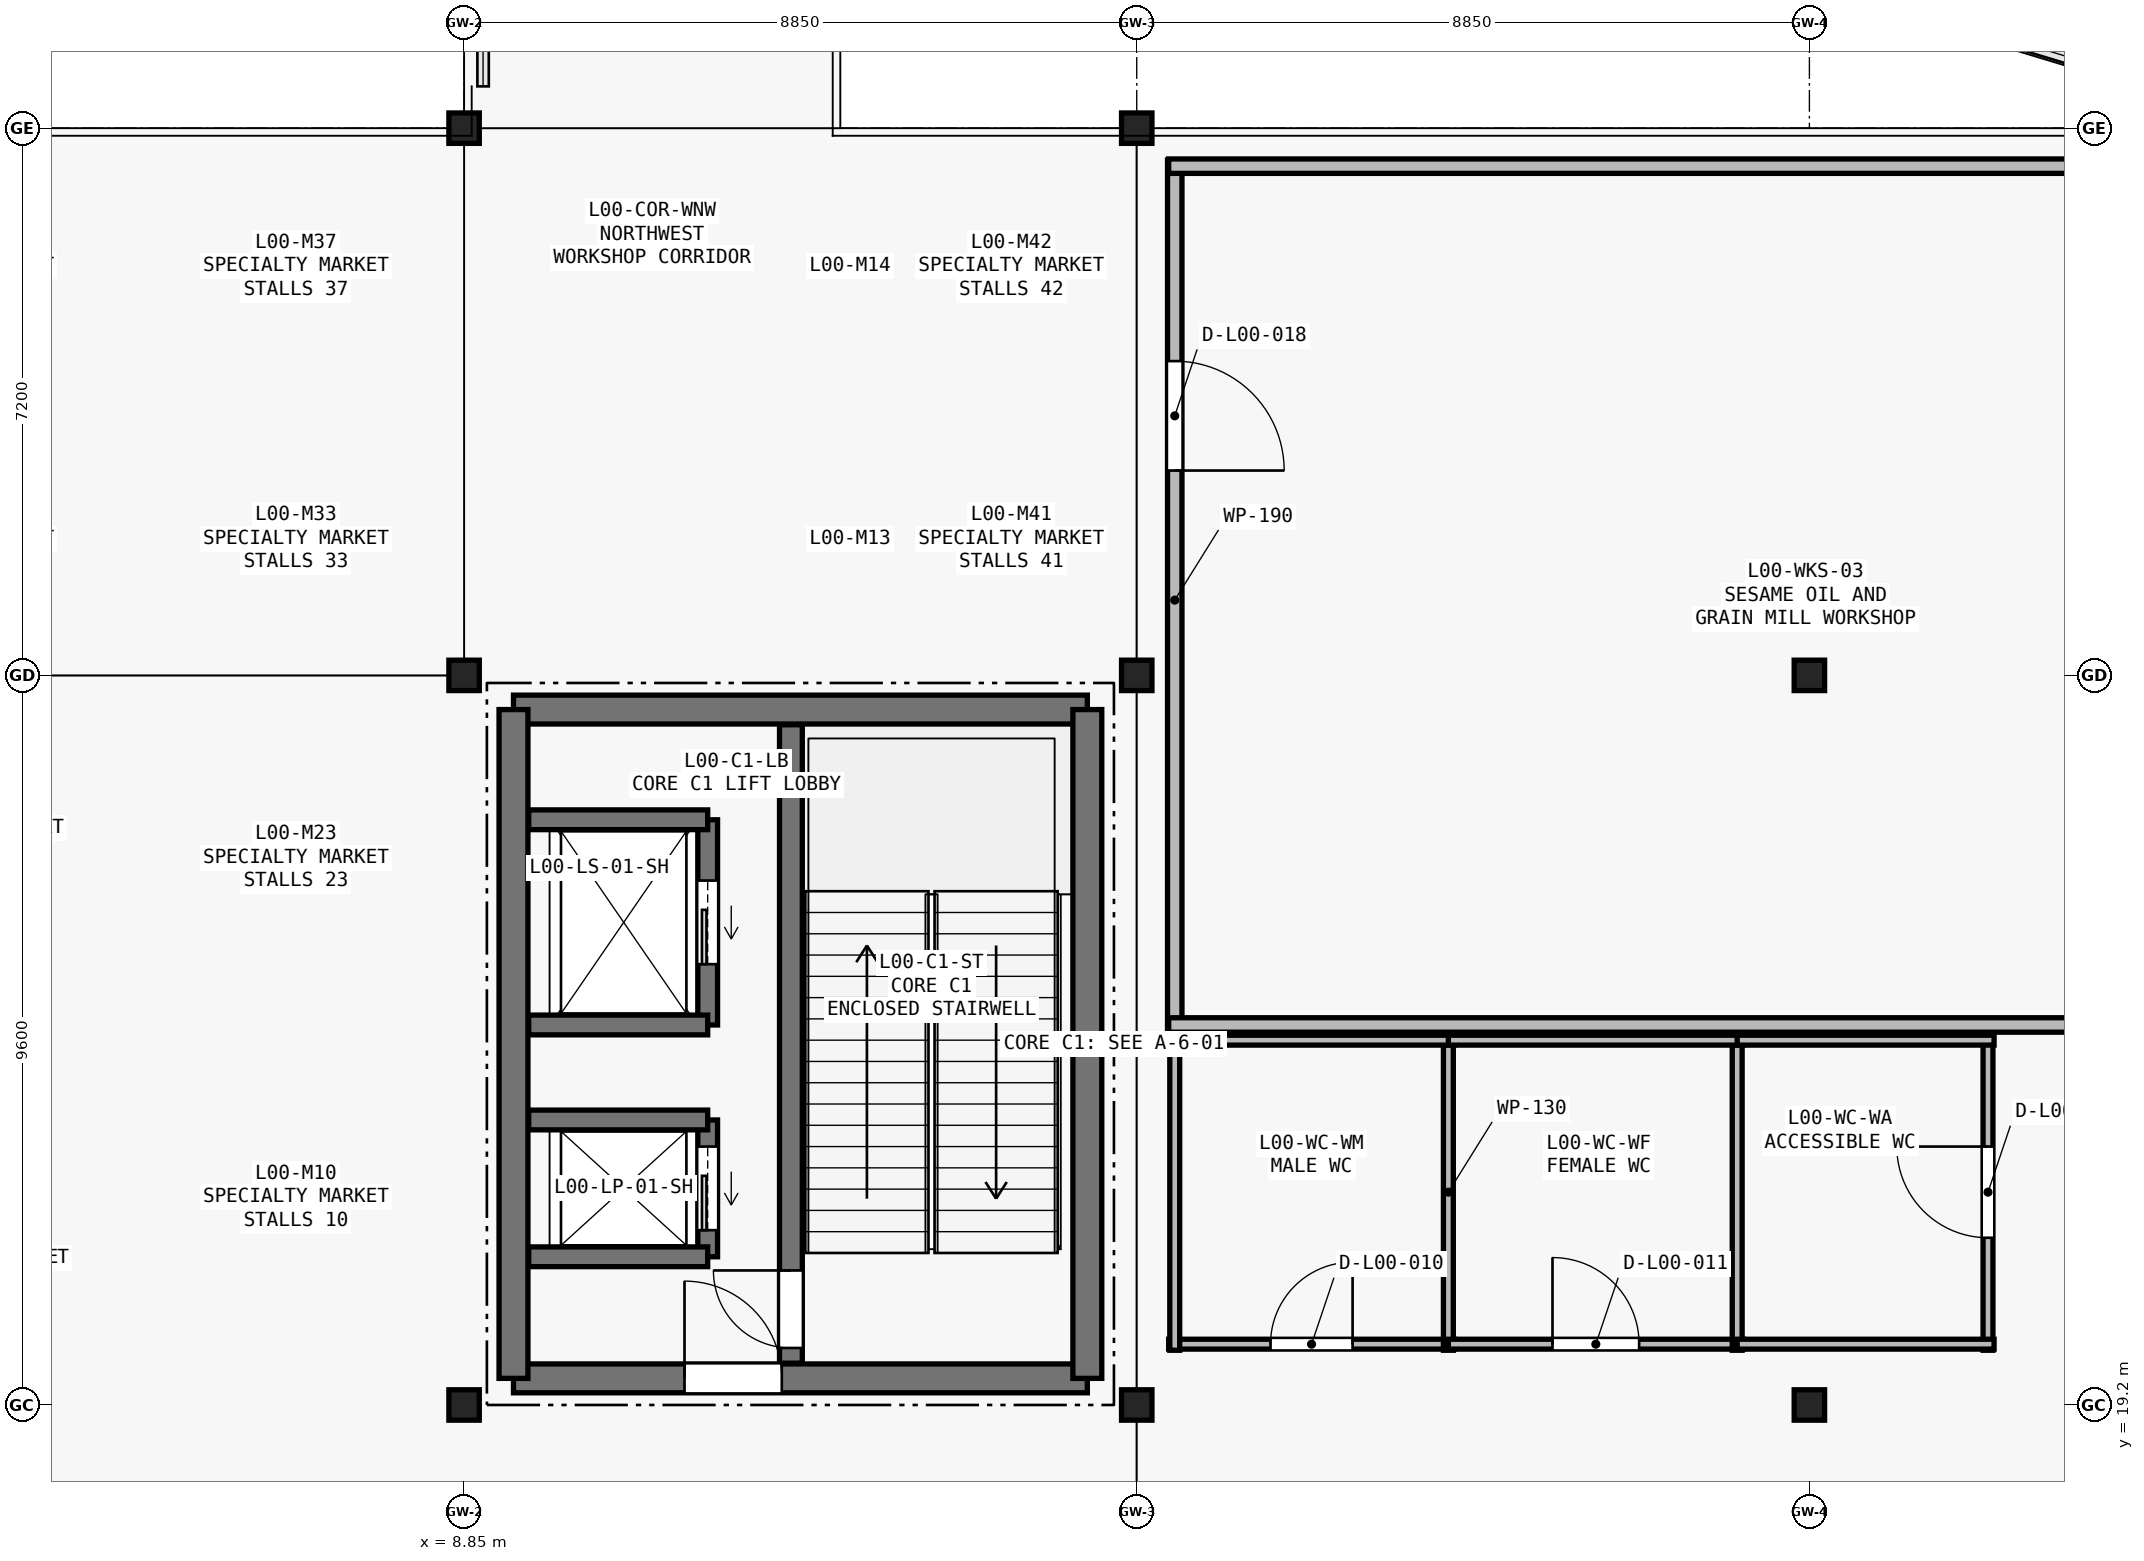
"""IFC4 building model, lengths in metres.
Left out: names, types, materials, properties, quantities, classifications, styles, units other than length and angle.
Written with IfcOpenShell. Run it as: python <this file> out.ifc"""

import sys

from ifc_helpers import new_model, si_unit, direction, frame, frame_2d, origin, origin_2d, place, context, subcontext, project, spatial, rectangle, i_section, extrude, element, fill, save


model = new_model("IFC4")
c1 = context("Model", 3, precision=1e-05, world=origin(), true_north=direction((0.0, 1.0)))
c2 = subcontext(c1, "Body", "Model", "MODEL_VIEW")
j1 = project(units=[si_unit("LENGTHUNIT", "METRE"), si_unit("PLANEANGLEUNIT", "RADIAN")], contexts=[c1])
p1 = place(None, origin())
s1 = spatial("IfcSite", under=j1, at=p1, CompositionType="ELEMENT")
p2 = place(p1, origin())
s2 = spatial("IfcBuilding", under=s1, at=p2, CompositionType="ELEMENT")
p3 = place(p2, origin())
s3 = spatial("IfcBuildingStorey", under=s2, at=p3, CompositionType="ELEMENT", Elevation=0.0)
for number, where, z_axis, x_axis in (
    (1, (8.85, 19.2, 0.0), (0.0, 0.0, 1.0), (1.0, 0.0, 0.0)),
    (2, (8.85, 28.8, 0.0), (0.0, 0.0, 1.0), (1.0, 0.0, 0.0)),
    (3, (8.85, 36.0, 0.0), (0.0, 0.0, 1.0), (1.0, 0.0, 0.0)),
    (4, (17.7, 19.2, 0.0), (0.0, 0.0, 1.0), (1.0, 0.0, 0.0)),
    (5, (17.7, 28.8, 0.0), (0.0, 0.0, 1.0), (1.0, 0.0, 0.0)),
    (6, (17.7, 36.0, 0.0), (0.0, 0.0, 1.0), (1.0, 0.0, 0.0)),
    (7, (26.55, 19.2, 0.0), (0.0, 0.0, 1.0), (1.0, 0.0, 0.0)),
    (8, (26.55, 28.8, 0.0), (0.0, 0.0, 1.0), (1.0, 0.0, 0.0)),
):
    element("IfcColumn", number, at=place(p3, frame(where, z_axis=z_axis, x_axis=x_axis)), inside=s3, PredefinedType="COLUMN", context=c2, shape_type="SweptSolid", body=[
        extrude(i_section(OverallWidth=0.4, OverallDepth=0.4, WebThickness=0.013, FlangeThickness=0.021, FilletRadius=0.022, at=origin_2d()), origin(), (0.0, 0.0, 1.0), 6.0),
    ])
p4 = place(p2, frame((0.0, 0.0, -5.4)))
s4 = spatial("IfcBuildingStorey", under=s2, at=p4, CompositionType="ELEMENT", Elevation=-5.4)
p5 = place(p4, frame((7.38, 84.2, 0.0), z_axis=(0.0, 0.0, 1.0), x_axis=(0.0, -1.0, 0.0)))
e9 = element("IfcWall", 9, at=p5, inside=s4, PredefinedType="USERDEFINED", context=c2, shape_type="SweptSolid", body=[
    extrude(rectangle(XDim=48.0, YDim=0.36, at=frame_2d((24.0, 0.0))), origin(), (0.0, 0.0, 1.0), 9.0),
])
p6 = place(p3, frame((9.5, 19.55, 0.0), z_axis=(0.0, 0.0, 1.0), x_axis=(1.0, 0.0, 0.0)))
e10 = element("IfcWall", 10, at=p6, inside=s3, PredefinedType="SHEAR", context=c2, shape_type="SweptSolid", body=[
    extrude(rectangle(XDim=7.55, YDim=0.38, at=frame_2d((3.775, 0.0))), origin(), (0.0, 0.0, 1.0), 6.0),
])
p7 = place(p6, frame((2.25, 0.0, 0.0)))
e11 = element("IfcOpeningElement", 11, at=p7, cuts=e10, PredefinedType="OPENING", context=c2, shape_type="SweptSolid", body=[
    extrude(rectangle(XDim=1.28, YDim=2.15, at=frame_2d((0.64, 1.075))), frame((0.0, 0.2, 0.0), z_axis=(0.0, -1.0, 0.0), x_axis=(1.0, 0.0, 0.0)), (0.0, 0.0, 1.0), 0.4),
])
p8 = place(p3, frame((17.05, 28.35, 0.0), z_axis=(0.0, 0.0, 1.0), x_axis=(-1.0, 0.0, 0.0)))
e12 = element("IfcWall", 12, at=p8, inside=s3, PredefinedType="SHEAR", context=c2, shape_type="SweptSolid", body=[
    extrude(rectangle(XDim=7.55, YDim=0.38, at=frame_2d((3.775, 0.0))), origin(), (0.0, 0.0, 1.0), 6.0),
])
for number, where, z_axis, x_axis in (
    (13, (9.5, 28.35, 0.0), (0.0, 0.0, 1.0), (0.0, -1.0, 0.0)),
    (14, (17.05, 19.55, 0.0), (0.0, 0.0, 1.0), (0.0, 1.0, 0.0)),
):
    element("IfcWall", number, at=place(p3, frame(where, z_axis=z_axis, x_axis=x_axis)), inside=s3, PredefinedType="SHEAR", context=c2, shape_type="SweptSolid", body=[
        extrude(rectangle(XDim=8.8, YDim=0.38, at=frame_2d((4.4, 0.0))), origin(), (0.0, 0.0, 1.0), 6.0),
    ])
p9 = place(p3, frame((13.15, 19.75, 0.0), z_axis=(0.0, 0.0, 1.0), x_axis=(0.0, 1.0, 0.0)))
e15 = element("IfcWall", 15, at=p9, inside=s3, PredefinedType="SHEAR", context=c2, shape_type="SweptSolid", body=[
    extrude(rectangle(XDim=8.4, YDim=0.3, at=frame_2d((4.2, 0.0))), origin(), (0.0, 0.0, 1.0), 6.0),
])
p10 = place(p9, frame((0.2, 0.0, 0.0)))
e16 = element("IfcOpeningElement", 16, at=p10, cuts=e15, PredefinedType="OPENING", context=c2, shape_type="SweptSolid", body=[
    extrude(rectangle(XDim=1.02, YDim=2.1, at=frame_2d((0.51, 1.05))), frame((0.0, 0.16, 0.0), z_axis=(0.0, -1.0, 0.0), x_axis=(1.0, 0.0, 0.0)), (0.0, 0.0, 1.0), 0.32),
])
p11 = place(p3, frame((12.055, 21.15, 0.0), z_axis=(0.0, 0.0, 1.0), x_axis=(0.0, 1.0, 0.0)))
e17 = element("IfcWall", 17, at=p11, inside=s3, PredefinedType="SHEAR", context=c2, shape_type="SweptSolid", body=[
    extrude(rectangle(XDim=1.8, YDim=0.26, at=frame_2d((0.9, 0.0))), origin(), (0.0, 0.0, 1.0), 6.0),
])
p12 = place(p11, frame((0.35, 0.0, 0.0)))
e18 = element("IfcOpeningElement", 18, at=p12, cuts=e17, PredefinedType="OPENING", context=c2, shape_type="SweptSolid", body=[
    extrude(rectangle(XDim=1.1, YDim=2.15, at=frame_2d((0.55, 1.075))), frame((0.0, 0.14, 0.0), z_axis=(0.0, -1.0, 0.0), x_axis=(1.0, 0.0, 0.0)), (0.0, 0.0, 1.0), 0.28),
])
for number, where, z_axis, x_axis in (
    (19, (9.7, 21.15, 0.0), (0.0, 0.0, 1.0), (1.0, 0.0, 0.0)),
    (20, (9.7, 22.95, 0.0), (0.0, 0.0, 1.0), (1.0, 0.0, 0.0)),
):
    element("IfcWall", number, at=place(p3, frame(where, z_axis=z_axis, x_axis=x_axis)), inside=s3, PredefinedType="SHEAR", context=c2, shape_type="SweptSolid", body=[
        extrude(rectangle(XDim=2.355, YDim=0.26, at=frame_2d((1.177, 0.0))), origin(), (0.0, 0.0, 1.0), 6.0),
    ])
p13 = place(p3, frame((12.055, 24.2, 0.0), z_axis=(0.0, 0.0, 1.0), x_axis=(0.0, 1.0, 0.0)))
e21 = element("IfcWall", 21, at=p13, inside=s3, PredefinedType="SHEAR", context=c2, shape_type="SweptSolid", body=[
    extrude(rectangle(XDim=2.7, YDim=0.26, at=frame_2d((1.35, 0.0))), origin(), (0.0, 0.0, 1.0), 6.0),
])
p14 = place(p13, frame((0.8, 0.0, 0.0)))
e22 = element("IfcOpeningElement", 22, at=p14, cuts=e21, PredefinedType="OPENING", context=c2, shape_type="SweptSolid", body=[
    extrude(rectangle(XDim=1.1, YDim=2.15, at=frame_2d((0.55, 1.075))), frame((0.0, 0.14, 0.0), z_axis=(0.0, -1.0, 0.0), x_axis=(1.0, 0.0, 0.0)), (0.0, 0.0, 1.0), 0.28),
])
for number, where, z_axis, x_axis in (
    (23, (9.7, 24.2, 0.0), (0.0, 0.0, 1.0), (1.0, 0.0, 0.0)),
    (24, (9.7, 26.9, 0.0), (0.0, 0.0, 1.0), (1.0, 0.0, 0.0)),
):
    element("IfcWall", number, at=place(p3, frame(where, z_axis=z_axis, x_axis=x_axis)), inside=s3, PredefinedType="SHEAR", context=c2, shape_type="SweptSolid", body=[
        extrude(rectangle(XDim=2.355, YDim=0.26, at=frame_2d((1.177, 0.0))), origin(), (0.0, 0.0, 1.0), 6.0),
    ])
p15 = place(p3, frame((18.12, 20.0, 0.0), z_axis=(0.0, 0.0, 1.0), x_axis=(1.0, 0.0, 0.0)))
e25 = element("IfcWall", 25, at=p15, inside=s3, PredefinedType="PARTITIONING", context=c2, shape_type="SweptSolid", body=[
    extrude(rectangle(XDim=3.76, YDim=0.13, at=frame_2d((1.88, 0.0))), origin(), (0.0, 0.0, 1.0), 5.52),
])
p16 = place(p15, frame((1.34, 0.0, 0.0)))
e26 = element("IfcOpeningElement", 26, at=p16, cuts=e25, PredefinedType="OPENING", context=c2, shape_type="SweptSolid", body=[
    extrude(rectangle(XDim=1.08, YDim=2.22, at=frame_2d((0.54, 1.11))), frame((0.0, 0.075, 0.0), z_axis=(0.0, -1.0, 0.0), x_axis=(1.0, 0.0, 0.0)), (0.0, 0.0, 1.0), 0.15),
])
for number, where, z_axis, x_axis in (
    (27, (21.8, 19.92, 0.0), (0.0, 0.0, 1.0), (0.0, 1.0, 0.0)),
    (28, (18.2, 24.08, 0.0), (0.0, 0.0, 1.0), (0.0, -1.0, 0.0)),
):
    element("IfcWall", number, at=place(p3, frame(where, z_axis=z_axis, x_axis=x_axis)), inside=s3, PredefinedType="PARTITIONING", context=c2, shape_type="SweptSolid", body=[
        extrude(rectangle(XDim=4.16, YDim=0.13, at=frame_2d((2.08, 0.0))), origin(), (0.0, 0.0, 1.0), 5.52),
    ])
p17 = place(p3, frame((21.88, 24.0, 0.0), z_axis=(0.0, 0.0, 1.0), x_axis=(-1.0, 0.0, 0.0)))
e29 = element("IfcWall", 29, at=p17, inside=s3, PredefinedType="PARTITIONING", context=c2, shape_type="SweptSolid", body=[
    extrude(rectangle(XDim=3.76, YDim=0.13, at=frame_2d((1.88, 0.0))), origin(), (0.0, 0.0, 1.0), 5.52),
])
p18 = place(p3, frame((21.8, 20.0, 0.0), z_axis=(0.0, 0.0, 1.0), x_axis=(1.0, 0.0, 0.0)))
e30 = element("IfcWall", 30, at=p18, inside=s3, PredefinedType="PARTITIONING", context=c2, shape_type="SweptSolid", body=[
    extrude(rectangle(XDim=3.88, YDim=0.13, at=frame_2d((1.94, 0.0))), origin(), (0.0, 0.0, 1.0), 5.52),
])
p19 = place(p18, frame((1.37, 0.0, 0.0)))
e31 = element("IfcOpeningElement", 31, at=p19, cuts=e30, PredefinedType="OPENING", context=c2, shape_type="SweptSolid", body=[
    extrude(rectangle(XDim=1.14, YDim=2.22, at=frame_2d((0.57, 1.11))), frame((0.0, 0.075, 0.0), z_axis=(0.0, -1.0, 0.0), x_axis=(1.0, 0.0, 0.0)), (0.0, 0.0, 1.0), 0.15),
])
p20 = place(p3, frame((25.6, 19.92, 0.0), z_axis=(0.0, 0.0, 1.0), x_axis=(0.0, 1.0, 0.0)))
e32 = element("IfcWall", 32, at=p20, inside=s3, PredefinedType="PARTITIONING", context=c2, shape_type="SweptSolid", body=[
    extrude(rectangle(XDim=4.16, YDim=0.13, at=frame_2d((2.08, 0.0))), origin(), (0.0, 0.0, 1.0), 5.52),
])
p21 = place(p3, frame((25.68, 24.0, 0.0), z_axis=(0.0, 0.0, 1.0), x_axis=(-1.0, 0.0, 0.0)))
e33 = element("IfcWall", 33, at=p21, inside=s3, PredefinedType="PARTITIONING", context=c2, shape_type="SweptSolid", body=[
    extrude(rectangle(XDim=3.88, YDim=0.13, at=frame_2d((1.94, 0.0))), origin(), (0.0, 0.0, 1.0), 5.52),
])
p22 = place(p3, frame((28.9, 19.92, 0.0), z_axis=(0.0, 0.0, 1.0), x_axis=(0.0, 1.0, 0.0)))
e34 = element("IfcWall", 34, at=p22, inside=s3, PredefinedType="PARTITIONING", context=c2, shape_type="SweptSolid", body=[
    extrude(rectangle(XDim=4.16, YDim=0.13, at=frame_2d((2.08, 0.0))), origin(), (0.0, 0.0, 1.0), 5.52),
])
p23 = place(p22, frame((1.48, 0.0, 0.0)))
e35 = element("IfcOpeningElement", 35, at=p23, cuts=e34, PredefinedType="OPENING", context=c2, shape_type="SweptSolid", body=[
    extrude(rectangle(XDim=1.2, YDim=2.22, at=frame_2d((0.6, 1.11))), frame((0.0, 0.075, 0.0), z_axis=(0.0, -1.0, 0.0), x_axis=(1.0, 0.0, 0.0)), (0.0, 0.0, 1.0), 0.15),
])
for number, where, z_axis, x_axis in (
    (36, (25.6, 20.0, 0.0), (0.0, 0.0, 1.0), (1.0, 0.0, 0.0)),
    (37, (28.98, 24.0, 0.0), (0.0, 0.0, 1.0), (-1.0, 0.0, 0.0)),
):
    element("IfcWall", number, at=place(p3, frame(where, z_axis=z_axis, x_axis=x_axis)), inside=s3, PredefinedType="PARTITIONING", context=c2, shape_type="SweptSolid", body=[
        extrude(rectangle(XDim=3.38, YDim=0.13, at=frame_2d((1.69, 0.0))), origin(), (0.0, 0.0, 1.0), 5.52),
    ])
p24 = place(p3, frame((18.2, 35.58, 0.0), z_axis=(0.0, 0.0, 1.0), x_axis=(0.0, -1.0, 0.0)))
e38 = element("IfcWall", 38, at=p24, inside=s3, PredefinedType="PARTITIONING", context=c2, shape_type="SweptSolid", body=[
    extrude(rectangle(XDim=11.58, YDim=0.19, at=frame_2d((5.79, 0.0))), origin(), (0.0, 0.0, 1.0), 5.52),
])
p25 = place(p24, frame((2.645, 0.0, 0.0)))
e39 = element("IfcOpeningElement", 39, at=p25, cuts=e38, PredefinedType="OPENING", context=c2, shape_type="SweptSolid", body=[
    extrude(rectangle(XDim=1.44, YDim=2.15, at=frame_2d((0.72, 1.075))), frame((0.0, 0.105, 0.0), z_axis=(0.0, -1.0, 0.0), x_axis=(1.0, 0.0, 0.0)), (0.0, 0.0, 1.0), 0.21),
])
for number, where, z_axis, x_axis in (
    (40, (18.12, 24.2, 0.0), (0.0, 0.0, 1.0), (1.0, 0.0, 0.0)),
    (41, (34.88, 35.5, 0.0), (0.0, 0.0, 1.0), (-1.0, 0.0, 0.0)),
):
    element("IfcWall", number, at=place(p3, frame(where, z_axis=z_axis, x_axis=x_axis)), inside=s3, PredefinedType="PARTITIONING", context=c2, shape_type="SweptSolid", body=[
        extrude(rectangle(XDim=16.76, YDim=0.19, at=frame_2d((8.38, 0.0))), origin(), (0.0, 0.0, 1.0), 5.52),
    ])
p26 = place(p7, origin())
e42 = element("IfcDoor", 42, at=p26, inside=s3, OperationType="SINGLE_SWING_LEFT", PredefinedType="DOOR", context=c2, shape_type="SweptSolid", body=[
    extrude(rectangle(XDim=1.28, YDim=2.15, at=frame_2d((0.64, 1.075))), frame((0.0, 0.025, 0.0), z_axis=(0.0, -1.0, 0.0), x_axis=(1.0, 0.0, 0.0)), (0.0, 0.0, 1.0), 0.05),
])
fill(e11, e42)
p27 = place(p10, origin())
e43 = element("IfcDoor", 43, at=p27, inside=s3, OperationType="SINGLE_SWING_RIGHT", PredefinedType="DOOR", context=c2, shape_type="SweptSolid", body=[
    extrude(rectangle(XDim=1.02, YDim=2.1, at=frame_2d((0.51, 1.05))), frame((0.0, 0.025, 0.0), z_axis=(0.0, -1.0, 0.0), x_axis=(1.0, 0.0, 0.0)), (0.0, 0.0, 1.0), 0.05),
])
fill(e16, e43)
p28 = place(p12, origin())
e44 = element("IfcDoor", 44, at=p28, inside=s3, OperationType="SLIDING_TO_LEFT", PredefinedType="DOOR", context=c2, shape_type="SweptSolid", body=[
    extrude(rectangle(XDim=1.1, YDim=2.15, at=frame_2d((0.55, 1.075))), frame((0.0, 0.025, 0.0), z_axis=(0.0, -1.0, 0.0), x_axis=(1.0, 0.0, 0.0)), (0.0, 0.0, 1.0), 0.05),
])
fill(e18, e44)
p29 = place(p14, origin())
e45 = element("IfcDoor", 45, at=p29, inside=s3, OperationType="SLIDING_TO_LEFT", PredefinedType="DOOR", context=c2, shape_type="SweptSolid", body=[
    extrude(rectangle(XDim=1.1, YDim=2.15, at=frame_2d((0.55, 1.075))), frame((0.0, 0.025, 0.0), z_axis=(0.0, -1.0, 0.0), x_axis=(1.0, 0.0, 0.0)), (0.0, 0.0, 1.0), 0.05),
])
fill(e22, e45)
p30 = place(p16, origin())
e46 = element("IfcDoor", 46, at=p30, inside=s3, OperationType="SINGLE_SWING_RIGHT", PredefinedType="DOOR", context=c2, shape_type="SweptSolid", body=[
    extrude(rectangle(XDim=1.08, YDim=2.22, at=frame_2d((0.54, 1.11))), frame((0.0, 0.025, 0.0), z_axis=(0.0, -1.0, 0.0), x_axis=(1.0, 0.0, 0.0)), (0.0, 0.0, 1.0), 0.05),
])
fill(e26, e46)
p31 = place(p19, origin())
e47 = element("IfcDoor", 47, at=p31, inside=s3, OperationType="SINGLE_SWING_LEFT", PredefinedType="DOOR", context=c2, shape_type="SweptSolid", body=[
    extrude(rectangle(XDim=1.14, YDim=2.22, at=frame_2d((0.57, 1.11))), frame((0.0, 0.025, 0.0), z_axis=(0.0, -1.0, 0.0), x_axis=(1.0, 0.0, 0.0)), (0.0, 0.0, 1.0), 0.05),
])
fill(e31, e47)
p32 = place(p23, origin())
e48 = element("IfcDoor", 48, at=p32, inside=s3, OperationType="SINGLE_SWING_RIGHT", PredefinedType="DOOR", context=c2, shape_type="SweptSolid", body=[
    extrude(rectangle(XDim=1.2, YDim=2.22, at=frame_2d((0.6, 1.11))), frame((0.0, 0.025, 0.0), z_axis=(0.0, -1.0, 0.0), x_axis=(1.0, 0.0, 0.0)), (0.0, 0.0, 1.0), 0.05),
])
fill(e35, e48)
p33 = place(p25, origin())
e49 = element("IfcDoor", 49, at=p33, inside=s3, OperationType="SINGLE_SWING_RIGHT", PredefinedType="DOOR", context=c2, shape_type="SweptSolid", body=[
    extrude(rectangle(XDim=1.44, YDim=2.15, at=frame_2d((0.72, 1.075))), frame((0.0, 0.025, 0.0), z_axis=(0.0, -1.0, 0.0), x_axis=(1.0, 0.0, 0.0)), (0.0, 0.0, 1.0), 0.05),
])
fill(e39, e49)
save(model, sys.argv[1])
